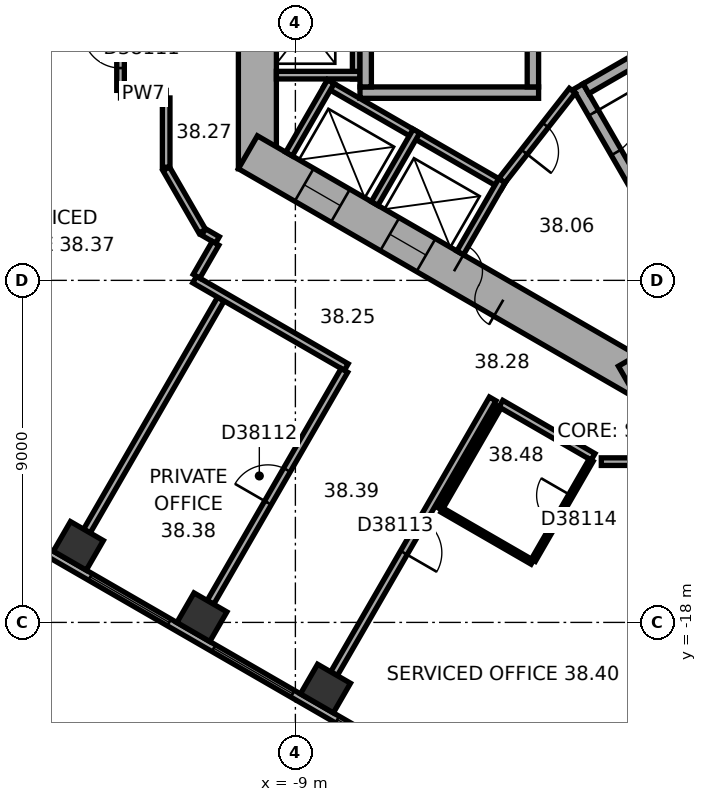
"""IFC4 building model, lengths in metres.
Left out: names, types, materials, properties, quantities, classifications, styles, units other than length and angle.
Written with IfcOpenShell. Run it as: python <this file> out.ifc"""

import sys

from ifc_helpers import new_model, si_unit, direction, frame, frame_2d, origin, origin_2d, place, context, subcontext, project, spatial, rectangle, extrude, element, fill, save


model = new_model("IFC4")
c1 = context("Model", 3, precision=1e-05, world=origin(), true_north=direction((0.0, 1.0)))
c2 = subcontext(c1, "Body", "Model", "MODEL_VIEW")
j1 = project(units=[si_unit("LENGTHUNIT", "METRE"), si_unit("PLANEANGLEUNIT", "RADIAN")], contexts=[c1])
p1 = place(None, origin())
s1 = spatial("IfcSite", under=j1, at=p1, CompositionType="ELEMENT")
p2 = place(p1, origin())
s2 = spatial("IfcBuilding", under=s1, at=p2, CompositionType="ELEMENT")
p3 = place(p2, frame((0.0, 0.0, 157.7)))
s3 = spatial("IfcBuildingStorey", under=s2, at=p3, CompositionType="ELEMENT", Elevation=157.7)
for number, where, z_axis, x_axis in (
    (1, (-14.711, -15.986, 0.0), (0.0, 0.0, 1.0), (0.866, -0.5, 0.0)),
    (2, (-11.46, -17.863, 0.0), (0.0, 0.0, 1.0), (0.866, -0.5, 0.0)),
    (3, (-8.208, -19.74, 0.0), (0.0, 0.0, 1.0), (0.866, -0.5, 0.0)),
):
    element("IfcColumn", number, at=place(p3, frame(where, z_axis=z_axis, x_axis=x_axis)), inside=s3, PredefinedType="COLUMN", context=c2, shape_type="SweptSolid", body=[
        extrude(rectangle(XDim=1.0, YDim=0.9, at=origin_2d()), origin(), (0.0, 0.0, 1.0), 3.7),
    ])
p4 = place(p3, frame((-10.0, 6.062, 0.0), z_axis=(0.0, 0.0, 1.0), x_axis=(0.0, -1.0, 0.0)))
e4 = element("IfcWall", 4, at=p4, inside=s3, PredefinedType="SHEAR", context=c2, shape_type="SweptSolid", body=[
    extrude(rectangle(XDim=12.125, YDim=1.0, at=frame_2d((6.062, 0.0))), origin(), (0.0, 0.0, 1.0), 3.7),
])
p5 = place(p4, frame((5.212, 0.0, 0.0)))
e5 = element("IfcOpeningElement", 5, at=p5, cuts=e4, PredefinedType="OPENING", context=c2, shape_type="SweptSolid", body=[
    extrude(rectangle(XDim=1.1, YDim=2.1, at=frame_2d((0.55, 1.05))), frame((0.0, 0.51, 0.0), z_axis=(0.0, -1.0, 0.0), x_axis=(1.0, 0.0, 0.0)), (0.0, 0.0, 1.0), 1.02),
])
p6 = place(p4, frame((7.812, 0.0, 0.0)))
e6 = element("IfcOpeningElement", 6, at=p6, cuts=e4, PredefinedType="OPENING", context=c2, shape_type="SweptSolid", body=[
    extrude(rectangle(XDim=1.1, YDim=2.1, at=frame_2d((0.55, 1.05))), frame((0.0, 0.51, 0.0), z_axis=(0.0, -1.0, 0.0), x_axis=(1.0, 0.0, 0.0)), (0.0, 0.0, 1.0), 1.02),
])
p7 = place(p3, frame((-10.25, -5.629, 0.0), z_axis=(0.0, 0.0, 1.0), x_axis=(0.866022616891, -0.50000482701, 0.0)))
e7 = element("IfcWall", 7, at=p7, inside=s3, PredefinedType="SHEAR", context=c2, shape_type="SweptSolid", body=[
    extrude(rectangle(XDim=12.125, YDim=1.0, at=frame_2d((6.062, 0.0))), origin(), (0.0, 0.0, 1.0), 3.7),
])
p8 = place(p7, frame((6.262, 0.0, 0.0)))
e8 = element("IfcOpeningElement", 8, at=p8, cuts=e7, PredefinedType="OPENING", context=c2, shape_type="SweptSolid", body=[
    extrude(rectangle(XDim=1.5, YDim=2.1, at=frame_2d((0.75, 1.05))), frame((0.0, 0.51, 0.0), z_axis=(0.0, -1.0, 0.0), x_axis=(1.0, 0.0, 0.0)), (0.0, 0.0, 1.0), 1.02),
])
p9 = place(p7, frame((1.712, 0.0, 0.0)))
e9 = element("IfcOpeningElement", 9, at=p9, cuts=e7, PredefinedType="OPENING", context=c2, shape_type="SweptSolid", body=[
    extrude(rectangle(XDim=1.1, YDim=2.1, at=frame_2d((0.55, 1.05))), frame((0.0, 0.51, 0.0), z_axis=(0.0, -1.0, 0.0), x_axis=(1.0, 0.0, 0.0)), (0.0, 0.0, 1.0), 1.02),
])
p10 = place(p7, frame((4.312, 0.0, 0.0)))
e10 = element("IfcOpeningElement", 10, at=p10, cuts=e7, PredefinedType="OPENING", context=c2, shape_type="SweptSolid", body=[
    extrude(rectangle(XDim=1.1, YDim=2.1, at=frame_2d((0.55, 1.05))), frame((0.0, 0.51, 0.0), z_axis=(0.0, -1.0, 0.0), x_axis=(1.0, 0.0, 0.0)), (0.0, 0.0, 1.0), 1.02),
])
p11 = place(p3, frame((-0.25, -11.691, 0.0), z_axis=(0.0, 0.0, 1.0), x_axis=(0.866022616891, 0.50000482701, 0.0)))
e11 = element("IfcWall", 11, at=p11, inside=s3, PredefinedType="SHEAR", context=c2, shape_type="SweptSolid", body=[
    extrude(rectangle(XDim=12.125, YDim=1.0, at=frame_2d((6.062, 0.0))), origin(), (0.0, 0.0, 1.0), 3.7),
])
p12 = place(p11, frame((2.612, 0.0, 0.0)))
e12 = element("IfcOpeningElement", 12, at=p12, cuts=e11, PredefinedType="OPENING", context=c2, shape_type="SweptSolid", body=[
    extrude(rectangle(XDim=1.1, YDim=2.1, at=frame_2d((0.55, 1.05))), frame((0.0, 0.51, 0.0), z_axis=(0.0, -1.0, 0.0), x_axis=(1.0, 0.0, 0.0)), (0.0, 0.0, 1.0), 1.02),
])
p13 = place(p11, frame((5.212, 0.0, 0.0)))
e13 = element("IfcOpeningElement", 13, at=p13, cuts=e11, PredefinedType="OPENING", context=c2, shape_type="SweptSolid", body=[
    extrude(rectangle(XDim=1.1, YDim=2.1, at=frame_2d((0.55, 1.05))), frame((0.0, 0.51, 0.0), z_axis=(0.0, -1.0, 0.0), x_axis=(1.0, 0.0, 0.0)), (0.0, 0.0, 1.0), 1.02),
])
p14 = place(p11, frame((7.812, 0.0, 0.0)))
e14 = element("IfcOpeningElement", 14, at=p14, cuts=e11, PredefinedType="OPENING", context=c2, shape_type="SweptSolid", body=[
    extrude(rectangle(XDim=1.1, YDim=2.1, at=frame_2d((0.55, 1.05))), frame((0.0, 0.51, 0.0), z_axis=(0.0, -1.0, 0.0), x_axis=(1.0, 0.0, 0.0)), (0.0, 0.0, 1.0), 1.02),
])
p15 = place(p3, frame((-18.789, -14.267, 0.0), z_axis=(0.0, 0.0, 1.0), x_axis=(0.866023315909, -0.500003616288, 0.0)))
e15 = element("IfcWall", 15, at=p15, inside=s3, PredefinedType="STANDARD", context=c2, shape_type="SweptSolid", body=[
    extrude(rectangle(XDim=20.044, YDim=0.2, at=frame_2d((10.022, 0.0))), origin(), (0.0, 0.0, 1.0), 3.7),
])
p16 = place(p15, frame((1.314, 0.0, 0.9)))
e16 = element("IfcOpeningElement", 16, at=p16, cuts=e15, PredefinedType="OPENING", context=c2, shape_type="SweptSolid", body=[
    extrude(rectangle(XDim=2.4, YDim=2.0, at=frame_2d((1.2, 1.0))), frame((0.0, 0.11, 0.0), z_axis=(0.0, -1.0, 0.0), x_axis=(1.0, 0.0, 0.0)), (0.0, 0.0, 1.0), 0.22),
])
p17 = place(p15, frame((5.069, 0.0, 0.9)))
e17 = element("IfcOpeningElement", 17, at=p17, cuts=e15, PredefinedType="OPENING", context=c2, shape_type="SweptSolid", body=[
    extrude(rectangle(XDim=2.4, YDim=2.0, at=frame_2d((1.2, 1.0))), frame((0.0, 0.11, 0.0), z_axis=(0.0, -1.0, 0.0), x_axis=(1.0, 0.0, 0.0)), (0.0, 0.0, 1.0), 0.22),
])
p18 = place(p15, frame((8.823, 0.0, 0.9)))
e18 = element("IfcOpeningElement", 18, at=p18, cuts=e15, PredefinedType="OPENING", context=c2, shape_type="SweptSolid", body=[
    extrude(rectangle(XDim=2.4, YDim=2.0, at=frame_2d((1.2, 1.0))), frame((0.0, 0.11, 0.0), z_axis=(0.0, -1.0, 0.0), x_axis=(1.0, 0.0, 0.0)), (0.0, 0.0, 1.0), 0.22),
])
p19 = place(p15, frame((12.577, 0.0, 0.9)))
e19 = element("IfcOpeningElement", 19, at=p19, cuts=e15, PredefinedType="OPENING", context=c2, shape_type="SweptSolid", body=[
    extrude(rectangle(XDim=2.4, YDim=2.0, at=frame_2d((1.2, 1.0))), frame((0.0, 0.11, 0.0), z_axis=(0.0, -1.0, 0.0), x_axis=(1.0, 0.0, 0.0)), (0.0, 0.0, 1.0), 0.22),
])
p20 = place(p15, frame((16.331, 0.0, 0.9)))
e20 = element("IfcOpeningElement", 20, at=p20, cuts=e15, PredefinedType="OPENING", context=c2, shape_type="SweptSolid", body=[
    extrude(rectangle(XDim=2.4, YDim=2.0, at=frame_2d((1.2, 1.0))), frame((0.0, 0.11, 0.0), z_axis=(0.0, -1.0, 0.0), x_axis=(1.0, 0.0, 0.0)), (0.0, 0.0, 1.0), 0.22),
])
p21 = place(p3, frame((-7.4, 4.3, 0.0), z_axis=(0.0, 0.0, 1.0), x_axis=(0.0, -1.0, 0.0)))
e21 = element("IfcWall", 21, at=p21, inside=s3, PredefinedType="PARTITIONING", context=c2, shape_type="SweptSolid", body=[
    extrude(rectangle(XDim=8.0, YDim=0.2, at=frame_2d((4.0, 0.0))), origin(), (0.0, 0.0, 1.0), 3.42),
])
p22 = place(p3, frame((-7.3, -3.6, 0.0), z_axis=(0.0, 0.0, 1.0), x_axis=(-1.0, 0.0, 0.0)))
e22 = element("IfcWall", 22, at=p22, inside=s3, PredefinedType="PARTITIONING", context=c2, shape_type="SweptSolid", body=[
    extrude(rectangle(XDim=2.2, YDim=0.2, at=frame_2d((1.1, 0.0))), origin(), (0.0, 0.0, 1.0), 3.42),
])
p23 = place(p3, frame((-8.203, -3.809, 0.0), z_axis=(0.0, 0.0, 1.0), x_axis=(0.866028230842, -0.499995103361, 0.0)))
e23 = element("IfcWall", 23, at=p23, inside=s3, PredefinedType="PARTITIONING", context=c2, shape_type="SweptSolid", body=[
    extrude(rectangle(XDim=5.4, YDim=0.2, at=frame_2d((2.7, 0.0))), origin(), (0.0, 0.0, 1.0), 3.42),
])
for number, where, z_axis, x_axis in (
    (24, (-8.067, -3.772, 0.0), (0.0, 0.0, 1.0), (-0.5, -0.866, 0.0)),
    (25, (-5.815, -5.072, 0.0), (0.0, 0.0, 1.0), (-0.5, -0.866, 0.0)),
):
    element("IfcWall", number, at=place(p3, frame(where, z_axis=z_axis, x_axis=x_axis)), inside=s3, PredefinedType="PARTITIONING", context=c2, shape_type="SweptSolid", body=[
        extrude(rectangle(XDim=2.2, YDim=0.2, at=frame_2d((1.1, 0.0))), origin(), (0.0, 0.0, 1.0), 3.42),
    ])
p24 = place(p3, frame((-3.563, -6.372, 0.0), z_axis=(0.0, 0.0, 1.0), x_axis=(-0.499994660107, -0.866028486751, 0.0)))
e26 = element("IfcWall", 26, at=p24, inside=s3, PredefinedType="PARTITIONING", context=c2, shape_type="SweptSolid", body=[
    extrude(rectangle(XDim=2.2, YDim=0.2, at=frame_2d((1.1, 0.0))), origin(), (0.0, 0.0, 1.0), 3.42),
])
p25 = place(p3, frame((-2.6, -4.06, 0.0), z_axis=(0.0, 0.0, 1.0), x_axis=(-1.0, 0.0, 0.0)))
e27 = element("IfcWall", 27, at=p25, inside=s3, PredefinedType="SHEAR", context=c2, shape_type="SweptSolid", body=[
    extrude(rectangle(XDim=4.7, YDim=0.3, at=frame_2d((2.35, 0.0))), origin(), (0.0, 0.0, 1.0), 3.42),
])
for number, where, z_axis, x_axis in (
    (28, (-2.75, 3.15, 0.0), (0.0, 0.0, 1.0), (0.0, -1.0, 0.0)),
    (29, (-7.15, 3.15, 0.0), (0.0, 0.0, 1.0), (0.0, -1.0, 0.0)),
):
    element("IfcWall", number, at=place(p3, frame(where, z_axis=z_axis, x_axis=x_axis)), inside=s3, PredefinedType="SHEAR", context=c2, shape_type="SweptSolid", body=[
        extrude(rectangle(XDim=7.06, YDim=0.3, at=frame_2d((3.53, 0.0))), origin(), (0.0, 0.0, 1.0), 3.42),
    ])
p26 = place(p3, frame((-1.558, -3.902, 0.0), z_axis=(0.0, 0.0, 1.0), x_axis=(0.499977259774, -0.866038532462, 0.0)))
e30 = element("IfcWall", 30, at=p26, inside=s3, PredefinedType="SHEAR", context=c2, shape_type="SweptSolid", body=[
    extrude(rectangle(XDim=4.7, YDim=0.3, at=frame_2d((2.35, 0.0))), origin(), (0.0, 0.0, 1.0), 3.42),
])
p27 = place(p26, frame((0.8, 0.0, 0.0)))
e31 = element("IfcOpeningElement", 31, at=p27, cuts=e30, PredefinedType="OPENING", context=c2, shape_type="SweptSolid", body=[
    extrude(rectangle(XDim=1.2, YDim=2.1, at=frame_2d((0.6, 1.05))), frame((0.0, 0.16, 0.0), z_axis=(0.0, -1.0, 0.0), x_axis=(1.0, 0.0, 0.0)), (0.0, 0.0, 1.0), 0.32),
])
p28 = place(p3, frame((-1.353, -3.957, 0.0), z_axis=(0.0, 0.0, 1.0), x_axis=(0.866027801685, 0.499995846692, 0.0)))
e32 = element("IfcWall", 32, at=p28, inside=s3, PredefinedType="SHEAR", context=c2, shape_type="SweptSolid", body=[
    extrude(rectangle(XDim=7.06, YDim=0.3, at=frame_2d((3.53, 0.0))), origin(), (0.0, 0.0, 1.0), 3.42),
])
p29 = place(p3, frame((-1.712, -4.008, 0.0), z_axis=(0.0, 0.0, 1.0), x_axis=(-0.616549420702, -0.787316208287, 0.0)))
e33 = element("IfcWall", 33, at=p29, inside=s3, PredefinedType="PARTITIONING", context=c2, shape_type="SweptSolid", body=[
    extrude(rectangle(XDim=3.002, YDim=0.2, at=frame_2d((1.501, 0.0))), origin(), (0.0, 0.0, 1.0), 3.42),
])
p30 = place(p29, frame((1.15, 0.0, 0.0)))
e34 = element("IfcOpeningElement", 34, at=p30, cuts=e33, PredefinedType="OPENING", context=c2, shape_type="SweptSolid", body=[
    extrude(rectangle(XDim=0.9, YDim=2.1, at=frame_2d((0.45, 1.05))), frame((0.0, 0.11, 0.0), z_axis=(0.0, -1.0, 0.0), x_axis=(1.0, 0.0, 0.0)), (0.0, 0.0, 1.0), 0.22),
])
p31 = place(p3, frame((-14.486, -15.597, 0.0), z_axis=(0.0, 0.0, 1.0), x_axis=(0.499983284935, 0.866035054017, 0.0)))
e35 = element("IfcWall", 35, at=p31, inside=s3, PredefinedType="PARTITIONING", context=c2, shape_type="SweptSolid", body=[
    extrude(rectangle(XDim=7.049, YDim=0.2, at=frame_2d((3.524, 0.0))), origin(), (0.0, 0.0, 1.0), 3.42),
])
p32 = place(p3, frame((-13.601, -4.101, 0.0), z_axis=(0.0, 0.0, 1.0), x_axis=(1.0, 0.0, 0.0)))
e36 = element("IfcWall", 36, at=p32, inside=s3, PredefinedType="PARTITIONING", context=c2, shape_type="SweptSolid", body=[
    extrude(rectangle(XDim=1.201, YDim=0.2, at=frame_2d((0.601, 0.0))), origin(), (0.0, 0.0, 1.0), 3.42),
])
p33 = place(p3, frame((-13.601, 2.101, 0.0), z_axis=(0.0, 0.0, 1.0), x_axis=(0.0, -1.0, 0.0)))
e37 = element("IfcWall", 37, at=p33, inside=s3, PredefinedType="PARTITIONING", context=c2, shape_type="SweptSolid", body=[
    extrude(rectangle(XDim=6.102, YDim=0.2, at=frame_2d((3.051, 0.0))), origin(), (0.0, 0.0, 1.0), 3.42),
])
p34 = place(p33, frame((1.464, 0.0, 0.0)))
e38 = element("IfcOpeningElement", 38, at=p34, cuts=e37, PredefinedType="OPENING", context=c2, shape_type="SweptSolid", body=[
    extrude(rectangle(XDim=1.0, YDim=2.1, at=frame_2d((0.5, 1.05))), frame((0.0, 0.11, 0.0), z_axis=(0.0, -1.0, 0.0), x_axis=(1.0, 0.0, 0.0)), (0.0, 0.0, 1.0), 0.22),
])
p35 = place(p33, frame((4.515, 0.0, 0.0)))
e39 = element("IfcOpeningElement", 39, at=p35, cuts=e37, PredefinedType="OPENING", context=c2, shape_type="SweptSolid", body=[
    extrude(rectangle(XDim=1.0, YDim=2.1, at=frame_2d((0.5, 1.05))), frame((0.0, 0.11, 0.0), z_axis=(0.0, -1.0, 0.0), x_axis=(1.0, 0.0, 0.0)), (0.0, 0.0, 1.0), 0.22),
])
p36 = place(p3, frame((-12.4, -6.062, 0.0), z_axis=(0.0, 0.0, 1.0), x_axis=(0.500022797313, -0.86601224135, 0.0)))
e40 = element("IfcWall", 40, at=p36, inside=s3, PredefinedType="PARTITIONING", context=c2, shape_type="SweptSolid", body=[
    extrude(rectangle(XDim=1.9, YDim=0.2, at=frame_2d((0.95, 0.0))), origin(), (0.0, 0.0, 1.0), 3.42),
])
p37 = place(p3, frame((-12.4, -4.201, 0.0), z_axis=(0.0, 0.0, 1.0), x_axis=(0.0, -1.0, 0.0)))
e41 = element("IfcWall", 41, at=p37, inside=s3, PredefinedType="PARTITIONING", context=c2, shape_type="SweptSolid", body=[
    extrude(rectangle(XDim=1.821, YDim=0.2, at=frame_2d((0.911, 0.0))), origin(), (0.0, 0.0, 1.0), 3.42),
])
p38 = place(p3, frame((-11.651, -8.978, 0.0), z_axis=(0.0, 0.0, 1.0), x_axis=(0.866010893236, -0.500025132165, 0.0)))
e42 = element("IfcWall", 42, at=p38, inside=s3, PredefinedType="PARTITIONING", context=c2, shape_type="SweptSolid", body=[
    extrude(rectangle(XDim=4.608, YDim=0.2, at=frame_2d((2.304, 0.0))), origin(), (0.0, 0.0, 1.0), 3.42),
])
p39 = place(p3, frame((-11.415, -7.728, 0.0), z_axis=(0.0, 0.0, 1.0), x_axis=(0.865915281873, -0.500190688257, 0.0)))
e43 = element("IfcWall", 43, at=p39, inside=s3, PredefinedType="PARTITIONING", context=c2, shape_type="SweptSolid", body=[
    extrude(rectangle(XDim=0.421, YDim=0.2, at=frame_2d((0.21, 0.0))), origin(), (0.0, 0.0, 1.0), 3.42),
])
p40 = place(p3, frame((-11.235, -17.474, 0.0), z_axis=(0.0, 0.0, 1.0), x_axis=(0.500009260695, 0.866020057054, 0.0)))
e44 = element("IfcWall", 44, at=p40, inside=s3, PredefinedType="PARTITIONING", context=c2, shape_type="SweptSolid", body=[
    extrude(rectangle(XDim=7.049, YDim=0.2, at=frame_2d((3.524, 0.0))), origin(), (0.0, 0.0, 1.0), 2.87),
])
p41 = place(p40, frame((3.024, 0.0, 0.0)))
e45 = element("IfcOpeningElement", 45, at=p41, cuts=e44, PredefinedType="OPENING", context=c2, shape_type="SweptSolid", body=[
    extrude(rectangle(XDim=1.0, YDim=2.1, at=frame_2d((0.5, 1.05))), frame((0.0, 0.11, 0.0), z_axis=(0.0, -1.0, 0.0), x_axis=(1.0, 0.0, 0.0)), (0.0, 0.0, 1.0), 0.22),
])
p42 = place(p3, frame((-11.101, -8.025, 0.0), z_axis=(0.0, 0.0, 1.0), x_axis=(-0.500074377092, -0.865982457891, 0.0)))
e46 = element("IfcWall", 46, at=p42, inside=s3, PredefinedType="PARTITIONING", context=c2, shape_type="SweptSolid", body=[
    extrude(rectangle(XDim=1.001, YDim=0.2, at=frame_2d((0.5, 0.0))), origin(), (0.0, 0.0, 1.0), 3.42),
])
p43 = place(p3, frame((-7.984, -19.351, 0.0), z_axis=(0.0, 0.0, 1.0), x_axis=(0.500010139422, 0.866019549707, 0.0)))
e47 = element("IfcWall", 47, at=p43, inside=s3, PredefinedType="PARTITIONING", context=c2, shape_type="SweptSolid", body=[
    extrude(rectangle(XDim=8.35, YDim=0.2, at=frame_2d((4.175, 0.0))), origin(), (0.0, 0.0, 1.0), 3.42),
])
p44 = place(p43, frame((3.675, 0.0, 0.0)))
e48 = element("IfcOpeningElement", 48, at=p44, cuts=e47, PredefinedType="OPENING", context=c2, shape_type="SweptSolid", body=[
    extrude(rectangle(XDim=1.0, YDim=2.1, at=frame_2d((0.5, 1.05))), frame((0.0, 0.11, 0.0), z_axis=(0.0, -1.0, 0.0), x_axis=(1.0, 0.0, 0.0)), (0.0, 0.0, 1.0), 0.22),
])
p45 = place(p3, frame((-5.192, -15.016, 0.0), z_axis=(0.0, 0.0, 1.0), x_axis=(0.500026960575, 0.86600983753, 0.0)))
e49 = element("IfcWall", 49, at=p45, inside=s3, PredefinedType="PARTITIONING", context=c2, shape_type="SweptSolid", body=[
    extrude(rectangle(XDim=3.1, YDim=0.12, at=frame_2d((1.55, 0.0))), origin(), (0.0, 0.0, 1.0), 3.42),
])
p46 = place(p3, frame((-3.592, -12.244, 0.0), z_axis=(0.0, 0.0, 1.0), x_axis=(0.866034573852, -0.49998411664, 0.0)))
e50 = element("IfcWall", 50, at=p46, inside=s3, PredefinedType="PARTITIONING", context=c2, shape_type="SweptSolid", body=[
    extrude(rectangle(XDim=2.8, YDim=0.2, at=frame_2d((1.4, 0.0))), origin(), (0.0, 0.0, 1.0), 3.42),
])
p47 = place(p3, frame((-2.767, -16.416, 0.0), z_axis=(0.0, 0.0, 1.0), x_axis=(-0.865997131366, 0.500048966069, 0.0)))
e51 = element("IfcWall", 51, at=p47, inside=s3, PredefinedType="PARTITIONING", context=c2, shape_type="SweptSolid", body=[
    extrude(rectangle(XDim=2.74, YDim=0.12, at=frame_2d((1.37, 0.0))), origin(), (0.0, 0.0, 1.0), 3.42),
])
p48 = place(p3, frame((-1.217, -13.731, 0.0), z_axis=(0.0, 0.0, 1.0), x_axis=(-0.499991248344, -0.866030456496, 0.0)))
e52 = element("IfcWall", 52, at=p48, inside=s3, PredefinedType="PARTITIONING", context=c2, shape_type="SweptSolid", body=[
    extrude(rectangle(XDim=3.04, YDim=0.12, at=frame_2d((1.52, 0.0))), origin(), (0.0, 0.0, 1.0), 3.42),
])
p49 = place(p48, frame((1.07, 0.0, 0.0)))
e53 = element("IfcOpeningElement", 53, at=p49, cuts=e52, PredefinedType="OPENING", context=c2, shape_type="SweptSolid", body=[
    extrude(rectangle(XDim=0.9, YDim=2.1, at=frame_2d((0.45, 1.05))), frame((0.0, 0.07, 0.0), z_axis=(0.0, -1.0, 0.0), x_axis=(1.0, 0.0, 0.0)), (0.0, 0.0, 1.0), 0.14),
])
p50 = place(p3, frame((-0.95, -13.77, 0.0), z_axis=(0.0, 0.0, 1.0), x_axis=(1.0, 0.0, 0.0)))
e54 = element("IfcWall", 54, at=p50, inside=s3, PredefinedType="PARTITIONING", context=c2, shape_type="SweptSolid", body=[
    extrude(rectangle(XDim=1.9, YDim=0.2, at=frame_2d((0.95, 0.0))), origin(), (0.0, 0.0, 1.0), 3.42),
])
p51 = place(p17, origin())
e55 = element("IfcWindow", 55, at=p51, inside=s3, PartitioningType="SINGLE_PANEL", PredefinedType="WINDOW", context=c2, shape_type="SweptSolid", body=[
    extrude(rectangle(XDim=2.4, YDim=2.0, at=frame_2d((1.2, 1.0))), frame((0.0, 0.03, 0.0), z_axis=(0.0, -1.0, 0.0), x_axis=(1.0, 0.0, 0.0)), (0.0, 0.0, 1.0), 0.06),
])
fill(e17, e55)
p52 = place(p18, origin())
e56 = element("IfcWindow", 56, at=p52, inside=s3, PartitioningType="SINGLE_PANEL", PredefinedType="WINDOW", context=c2, shape_type="SweptSolid", body=[
    extrude(rectangle(XDim=2.4, YDim=2.0, at=frame_2d((1.2, 1.0))), frame((0.0, 0.03, 0.0), z_axis=(0.0, -1.0, 0.0), x_axis=(1.0, 0.0, 0.0)), (0.0, 0.0, 1.0), 0.06),
])
fill(e18, e56)
p53 = place(p19, origin())
e57 = element("IfcWindow", 57, at=p53, inside=s3, PartitioningType="SINGLE_PANEL", PredefinedType="WINDOW", context=c2, shape_type="SweptSolid", body=[
    extrude(rectangle(XDim=2.4, YDim=2.0, at=frame_2d((1.2, 1.0))), frame((0.0, 0.03, 0.0), z_axis=(0.0, -1.0, 0.0), x_axis=(1.0, 0.0, 0.0)), (0.0, 0.0, 1.0), 0.06),
])
fill(e19, e57)
p54 = place(p8, origin())
e58 = element("IfcDoor", 58, at=p54, inside=s3, OperationType="DOUBLE_DOOR_SINGLE_SWING", PredefinedType="DOOR", context=c2, shape_type="SweptSolid", body=[
    extrude(rectangle(XDim=1.5, YDim=2.1, at=frame_2d((0.75, 1.05))), frame((0.0, 0.025, 0.0), z_axis=(0.0, -1.0, 0.0), x_axis=(1.0, 0.0, 0.0)), (0.0, 0.0, 1.0), 0.05),
])
fill(e8, e58)
p55 = place(p27, origin())
e59 = element("IfcDoor", 59, at=p55, inside=s3, OperationType="SINGLE_SWING_RIGHT", PredefinedType="DOOR", context=c2, shape_type="SweptSolid", body=[
    extrude(rectangle(XDim=1.2, YDim=2.1, at=frame_2d((0.6, 1.05))), frame((0.0, 0.025, 0.0), z_axis=(0.0, -1.0, 0.0), x_axis=(1.0, 0.0, 0.0)), (0.0, 0.0, 1.0), 0.05),
])
fill(e31, e59)
p56 = place(p30, origin())
e60 = element("IfcDoor", 60, at=p56, inside=s3, OperationType="SINGLE_SWING_LEFT", PredefinedType="DOOR", context=c2, shape_type="SweptSolid", body=[
    extrude(rectangle(XDim=0.9, YDim=2.1, at=frame_2d((0.45, 1.05))), frame((0.0, 0.025, 0.0), z_axis=(0.0, -1.0, 0.0), x_axis=(1.0, 0.0, 0.0)), (0.0, 0.0, 1.0), 0.05),
])
fill(e34, e60)
p57 = place(p9, origin())
e61 = element("IfcDoor", 61, at=p57, inside=s3, OperationType="DOUBLE_DOOR_SLIDING", PredefinedType="DOOR", context=c2, shape_type="SweptSolid", body=[
    extrude(rectangle(XDim=1.1, YDim=2.1, at=frame_2d((0.55, 1.05))), frame((0.0, 0.025, 0.0), z_axis=(0.0, -1.0, 0.0), x_axis=(1.0, 0.0, 0.0)), (0.0, 0.0, 1.0), 0.05),
])
fill(e9, e61)
p58 = place(p10, origin())
e62 = element("IfcDoor", 62, at=p58, inside=s3, OperationType="DOUBLE_DOOR_SLIDING", PredefinedType="DOOR", context=c2, shape_type="SweptSolid", body=[
    extrude(rectangle(XDim=1.1, YDim=2.1, at=frame_2d((0.55, 1.05))), frame((0.0, 0.025, 0.0), z_axis=(0.0, -1.0, 0.0), x_axis=(1.0, 0.0, 0.0)), (0.0, 0.0, 1.0), 0.05),
])
fill(e10, e62)
p59 = place(p35, origin())
e63 = element("IfcDoor", 63, at=p59, inside=s3, OperationType="SINGLE_SWING_LEFT", PredefinedType="DOOR", context=c2, shape_type="SweptSolid", body=[
    extrude(rectangle(XDim=1.0, YDim=2.1, at=frame_2d((0.5, 1.05))), frame((0.0, 0.025, 0.0), z_axis=(0.0, -1.0, 0.0), x_axis=(1.0, 0.0, 0.0)), (0.0, 0.0, 1.0), 0.05),
])
fill(e39, e63)
p60 = place(p41, origin())
e64 = element("IfcDoor", 64, at=p60, inside=s3, OperationType="SINGLE_SWING_LEFT", PredefinedType="DOOR", context=c2, shape_type="SweptSolid", body=[
    extrude(rectangle(XDim=1.0, YDim=2.1, at=frame_2d((0.5, 1.05))), frame((0.0, 0.025, 0.0), z_axis=(0.0, -1.0, 0.0), x_axis=(1.0, 0.0, 0.0)), (0.0, 0.0, 1.0), 0.05),
])
fill(e45, e64)
p61 = place(p44, origin())
e65 = element("IfcDoor", 65, at=p61, inside=s3, OperationType="SINGLE_SWING_LEFT", PredefinedType="DOOR", context=c2, shape_type="SweptSolid", body=[
    extrude(rectangle(XDim=1.0, YDim=2.1, at=frame_2d((0.5, 1.05))), frame((0.0, 0.025, 0.0), z_axis=(0.0, -1.0, 0.0), x_axis=(1.0, 0.0, 0.0)), (0.0, 0.0, 1.0), 0.05),
])
fill(e48, e65)
p62 = place(p49, origin())
e66 = element("IfcDoor", 66, at=p62, inside=s3, OperationType="SINGLE_SWING_LEFT", PredefinedType="DOOR", context=c2, shape_type="SweptSolid", body=[
    extrude(rectangle(XDim=0.9, YDim=2.1, at=frame_2d((0.45, 1.05))), frame((0.0, 0.025, 0.0), z_axis=(0.0, -1.0, 0.0), x_axis=(1.0, 0.0, 0.0)), (0.0, 0.0, 1.0), 0.05),
])
fill(e53, e66)
save(model, sys.argv[1])
